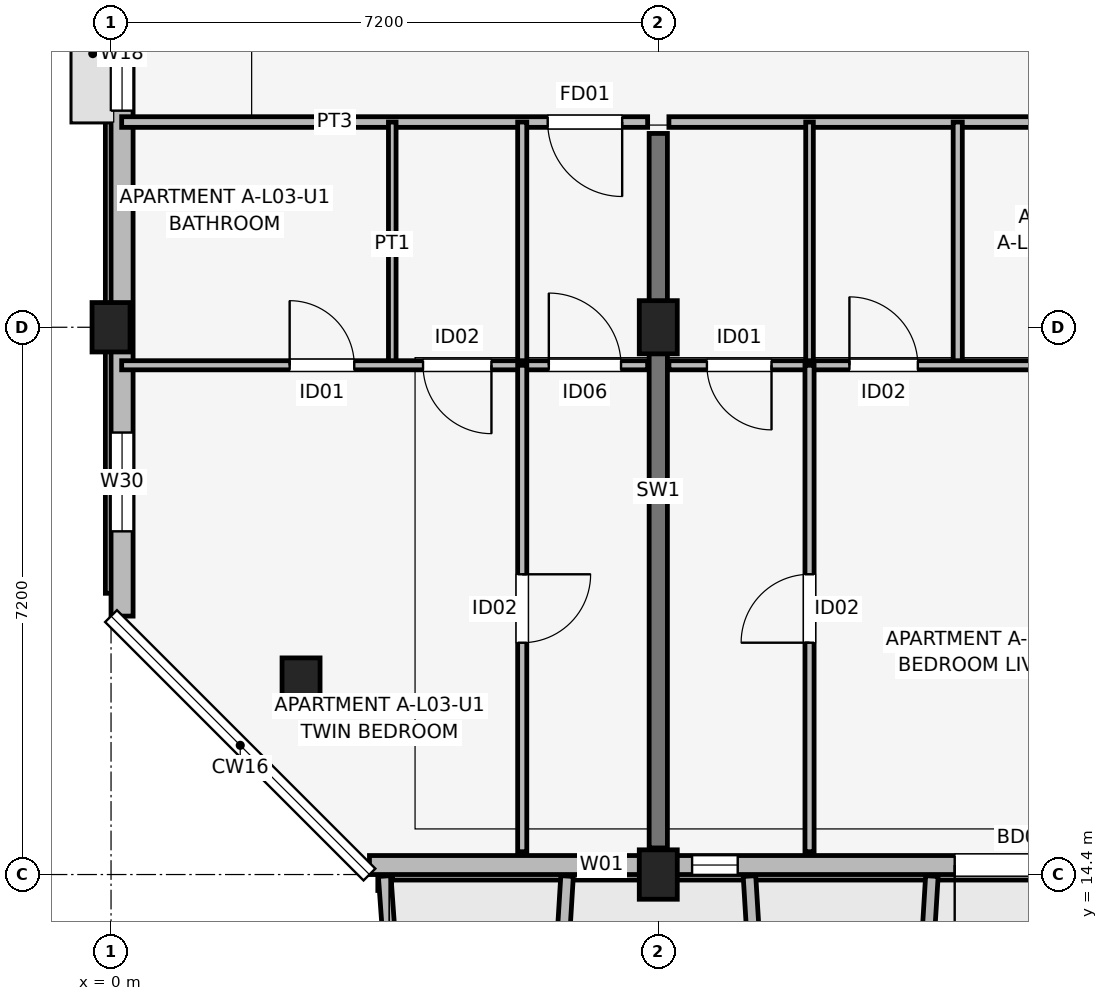
"""IFC4 building model, lengths in metres.
Left out: names, types, materials, properties, quantities, classifications, styles, units other than length and angle.
Written with IfcOpenShell. Run it as: python <this file> out.ifc"""

import sys

from ifc_helpers import new_model, si_unit, direction, frame, frame_2d, origin, origin_2d, place, context, subcontext, project, spatial, rectangle, extrude, element, fill, save


model = new_model("IFC4")
c1 = context("Model", 3, precision=1e-05, world=origin(), true_north=direction((0.0, 1.0)))
c2 = subcontext(c1, "Body", "Model", "MODEL_VIEW")
j1 = project(units=[si_unit("LENGTHUNIT", "METRE"), si_unit("PLANEANGLEUNIT", "RADIAN")], contexts=[c1])
p1 = place(None, origin())
s1 = spatial("IfcSite", under=j1, at=p1, CompositionType="ELEMENT")
p2 = place(p1, origin())
s2 = spatial("IfcBuilding", under=s1, at=p2, CompositionType="ELEMENT")
p3 = place(p2, frame((0.0, 0.0, 11.85)))
s3 = spatial("IfcBuildingStorey", under=s2, at=p3, CompositionType="ELEMENT", Elevation=11.85)
p4 = place(p3, frame((2.5, 16.9, 0.0), z_axis=(0.0, 0.0, 1.0), x_axis=(1.0, 0.0, 0.0)))
e1 = element("IfcColumn", 1, at=p4, inside=s3, PredefinedType="COLUMN", context=c2, shape_type="SweptSolid", body=[
    extrude(rectangle(XDim=0.5, YDim=0.7, at=origin_2d()), origin(), (0.0, 0.0, 1.0), 3.15),
])
for number, where, z_axis, x_axis in (
    (2, (0.0, 21.6, 0.0), (0.0, 0.0, 1.0), (1.0, 0.0, 0.0)),
    (3, (7.2, 14.4, 0.0), (0.0, 0.0, 1.0), (1.0, 0.0, 0.0)),
):
    element("IfcColumn", number, at=place(p3, frame(where, z_axis=z_axis, x_axis=x_axis)), inside=s3, PredefinedType="COLUMN", context=c2, shape_type="SweptSolid", body=[
        extrude(rectangle(XDim=0.5, YDim=0.65, at=origin_2d()), origin(), (0.0, 0.0, 1.0), 3.15),
    ])
p5 = place(p3, frame((7.2, 21.6, 0.0), z_axis=(0.0, 0.0, 1.0), x_axis=(1.0, 0.0, 0.0)))
e4 = element("IfcColumn", 4, at=p5, inside=s3, PredefinedType="COLUMN", context=c2, shape_type="SweptSolid", body=[
    extrude(rectangle(XDim=0.5, YDim=0.7, at=origin_2d()), origin(), (0.0, 0.0, 1.0), 3.15),
])
p6 = place(p3, frame((7.2, 14.75, 0.0), z_axis=(0.0, 0.0, 1.0), x_axis=(0.0, 1.0, 0.0)))
e5 = element("IfcWall", 5, at=p6, inside=s3, PredefinedType="SHEAR", context=c2, shape_type="SweptSolid", body=[
    extrude(rectangle(XDim=9.4, YDim=0.24, at=frame_2d((4.7, 0.0))), origin(), (0.0, 0.0, 1.0), 3.15),
])
p7 = place(p3, frame((3.4, 14.525, 0.0), z_axis=(0.0, 0.0, 1.0), x_axis=(1.0, 0.0, 0.0)))
e6 = element("IfcWall", 6, at=p7, inside=s3, PredefinedType="SOLIDWALL", context=c2, shape_type="SweptSolid", body=[
    extrude(rectangle(XDim=29.2, YDim=0.25, at=frame_2d((14.6, 0.0))), origin(), (0.0, 0.0, 1.0), 2.43),
])
p8 = place(p7, frame((9.5, 0.0, 0.0), z_axis=(0.0, 0.0, 1.0), x_axis=(-1.0, 0.0, 0.0)))
e7 = element("IfcOpeningElement", 7, at=p8, cuts=e6, PredefinedType="OPENING", context=c2, shape_type="SweptSolid", body=[
    extrude(rectangle(XDim=1.8, YDim=2.15, at=frame_2d((0.9, 1.075))), frame((0.0, 0.135, 0.0), z_axis=(0.0, -1.0, 0.0), x_axis=(1.0, 0.0, 0.0)), (0.0, 0.0, 1.0), 0.27),
])
p9 = place(p7, frame((23.825, 0.0, 0.0), z_axis=(0.0, 0.0, 1.0), x_axis=(-1.0, 0.0, 0.0)))
e8 = element("IfcOpeningElement", 8, at=p9, cuts=e6, PredefinedType="OPENING", context=c2, shape_type="SweptSolid", body=[
    extrude(rectangle(XDim=1.65, YDim=2.15, at=frame_2d((0.825, 1.075))), frame((0.0, 0.135, 0.0), z_axis=(0.0, -1.0, 0.0), x_axis=(1.0, 0.0, 0.0)), (0.0, 0.0, 1.0), 0.27),
])
p10 = place(p7, frame((2.755, 0.0, 0.75)))
e9 = element("IfcOpeningElement", 9, at=p10, cuts=e6, PredefinedType="OPENING", context=c2, shape_type="SweptSolid", body=[
    extrude(rectangle(XDim=0.6, YDim=1.25, at=frame_2d((0.3, 0.625))), frame((0.0, 0.135, 0.0), z_axis=(0.0, -1.0, 0.0), x_axis=(1.0, 0.0, 0.0)), (0.0, 0.0, 1.0), 0.27),
])
p11 = place(p7, frame((4.245, 0.0, 0.75)))
e10 = element("IfcOpeningElement", 10, at=p11, cuts=e6, PredefinedType="OPENING", context=c2, shape_type="SweptSolid", body=[
    extrude(rectangle(XDim=0.6, YDim=1.25, at=frame_2d((0.3, 0.625))), frame((0.0, 0.135, 0.0), z_axis=(0.0, -1.0, 0.0), x_axis=(1.0, 0.0, 0.0)), (0.0, 0.0, 1.0), 0.27),
])
p12 = place(p7, frame((12.54, 0.0, 0.7)))
e11 = element("IfcOpeningElement", 11, at=p12, cuts=e6, PredefinedType="OPENING", context=c2, shape_type="SweptSolid", body=[
    extrude(rectangle(XDim=1.72, YDim=1.6, at=frame_2d((0.86, 0.8))), frame((0.0, 0.135, 0.0), z_axis=(0.0, -1.0, 0.0), x_axis=(1.0, 0.0, 0.0)), (0.0, 0.0, 1.0), 0.27),
])
p13 = place(p7, frame((15.765, 0.0, 0.75)))
e12 = element("IfcOpeningElement", 12, at=p13, cuts=e6, PredefinedType="OPENING", context=c2, shape_type="SweptSolid", body=[
    extrude(rectangle(XDim=0.72, YDim=1.35, at=frame_2d((0.36, 0.675))), frame((0.0, 0.135, 0.0), z_axis=(0.0, -1.0, 0.0), x_axis=(1.0, 0.0, 0.0)), (0.0, 0.0, 1.0), 0.27),
])
p14 = place(p7, frame((19.555, 0.0, 0.75)))
e13 = element("IfcOpeningElement", 13, at=p14, cuts=e6, PredefinedType="OPENING", context=c2, shape_type="SweptSolid", body=[
    extrude(rectangle(XDim=0.72, YDim=1.35, at=frame_2d((0.36, 0.675))), frame((0.0, 0.135, 0.0), z_axis=(0.0, -1.0, 0.0), x_axis=(1.0, 0.0, 0.0)), (0.0, 0.0, 1.0), 0.27),
])
p15 = place(p7, frame((25.845, 0.0, 0.75)))
e14 = element("IfcOpeningElement", 14, at=p15, cuts=e6, PredefinedType="OPENING", context=c2, shape_type="SweptSolid", body=[
    extrude(rectangle(XDim=0.6, YDim=1.25, at=frame_2d((0.3, 0.625))), frame((0.0, 0.135, 0.0), z_axis=(0.0, -1.0, 0.0), x_axis=(1.0, 0.0, 0.0)), (0.0, 0.0, 1.0), 0.27),
])
p16 = place(p7, frame((27.68, 0.0, 0.75)))
e15 = element("IfcOpeningElement", 15, at=p16, cuts=e6, PredefinedType="OPENING", context=c2, shape_type="SweptSolid", body=[
    extrude(rectangle(XDim=1.1, YDim=1.5, at=frame_2d((0.55, 0.75))), frame((0.0, 0.135, 0.0), z_axis=(0.0, -1.0, 0.0), x_axis=(1.0, 0.0, 0.0)), (0.0, 0.0, 1.0), 0.27),
])
p17 = place(p3, frame((0.145, 32.6, 0.0), z_axis=(0.0, 0.0, 1.0), x_axis=(0.0, -1.0, 0.0)))
e16 = element("IfcWall", 16, at=p17, inside=s3, PredefinedType="SOLIDWALL", context=c2, shape_type="SweptSolid", body=[
    extrude(rectangle(XDim=14.8, YDim=0.29, at=frame_2d((7.4, 0.0))), origin(), (0.0, 0.0, 1.0), 2.38),
])
p18 = place(p17, frame((6.65, 0.0, 1.05)))
e17 = element("IfcOpeningElement", 17, at=p18, cuts=e16, PredefinedType="OPENING", context=c2, shape_type="SweptSolid", body=[
    extrude(rectangle(XDim=1.5, YDim=1.15, at=frame_2d((0.75, 0.575))), frame((0.0, 0.155, 0.0), z_axis=(0.0, -1.0, 0.0), x_axis=(1.0, 0.0, 0.0)), (0.0, 0.0, 1.0), 0.31),
])
p19 = place(p17, frame((12.385, 0.0, 0.72)))
e18 = element("IfcOpeningElement", 18, at=p19, cuts=e16, PredefinedType="OPENING", context=c2, shape_type="SweptSolid", body=[
    extrude(rectangle(XDim=1.3, YDim=1.55, at=frame_2d((0.65, 0.775))), frame((0.0, 0.155, 0.0), z_axis=(0.0, -1.0, 0.0), x_axis=(1.0, 0.0, 0.0)), (0.0, 0.0, 1.0), 0.31),
])
p20 = place(p3, frame((3.6, 14.38, 0.0), z_axis=(0.0, 0.0, 1.0), x_axis=(0.071194071069, -0.997462482625, 0.0)))
e19 = element("IfcWall", 19, at=p20, inside=s3, PredefinedType="ELEMENTEDWALL", context=c2, shape_type="SweptSolid", body=[
    extrude(rectangle(XDim=1.965, YDim=0.165, at=frame_2d((0.982, 0.0))), origin(), (0.0, 0.0, 1.0), 2.95),
])
p21 = place(p3, frame((6.0, 14.38, 0.0), z_axis=(0.0, 0.0, 1.0), x_axis=(-0.061170732449, -0.998127317276, 0.0)))
e20 = element("IfcWall", 20, at=p21, inside=s3, PredefinedType="ELEMENTEDWALL", context=c2, shape_type="SweptSolid", body=[
    extrude(rectangle(XDim=1.964, YDim=0.165, at=frame_2d((0.982, 0.0))), origin(), (0.0, 0.0, 1.0), 2.95),
])
for number, where, z_axis, x_axis in (
    (21, (8.4, 14.38, 0.0), (0.0, 0.0, 1.0), (0.061, -0.998, 0.0)),
    (22, (10.8, 14.38, 0.0), (0.0, 0.0, 1.0), (-0.061, -0.998, 0.0)),
):
    element("IfcWall", number, at=place(p3, frame(where, z_axis=z_axis, x_axis=x_axis)), inside=s3, PredefinedType="ELEMENTEDWALL", context=c2, shape_type="SweptSolid", body=[
        extrude(rectangle(XDim=1.964, YDim=0.165, at=frame_2d((0.982, 0.0))), origin(), (0.0, 0.0, 1.0), 2.58),
    ])
p22 = place(p3, frame((0.14, 24.3, 0.0), z_axis=(0.0, 0.0, 1.0), x_axis=(1.0, 0.0, 0.0)))
e23 = element("IfcWall", 23, at=p22, inside=s3, PredefinedType="PARTITIONING", context=c2, shape_type="SweptSolid", body=[
    extrude(rectangle(XDim=6.92, YDim=0.14, at=frame_2d((3.46, 0.0))), origin(), (0.0, 0.0, 1.0), 2.38),
])
p23 = place(p22, frame((6.585, 0.0, 0.0), z_axis=(0.0, 0.0, 1.0), x_axis=(-1.0, 0.0, 0.0)))
e24 = element("IfcOpeningElement", 24, at=p23, cuts=e23, PredefinedType="OPENING", context=c2, shape_type="SweptSolid", body=[
    extrude(rectangle(XDim=0.98, YDim=2.1, at=frame_2d((0.49, 1.05))), frame((0.0, 0.08, 0.0), z_axis=(0.0, -1.0, 0.0), x_axis=(1.0, 0.0, 0.0)), (0.0, 0.0, 1.0), 0.16),
])
p24 = place(p3, frame((3.7, 21.1, 0.0), z_axis=(0.0, 0.0, 1.0), x_axis=(0.0, 1.0, 0.0)))
e25 = element("IfcWall", 25, at=p24, inside=s3, PredefinedType="PARTITIONING", context=c2, shape_type="SweptSolid", body=[
    extrude(rectangle(XDim=3.2, YDim=0.1, at=frame_2d((1.6, 0.0))), origin(), (0.0, 0.0, 1.0), 2.375),
])
p25 = place(p3, frame((5.41, 21.1, 0.0), z_axis=(0.0, 0.0, 1.0), x_axis=(0.0, 1.0, 0.0)))
e26 = element("IfcWall", 26, at=p25, inside=s3, PredefinedType="PARTITIONING", context=c2, shape_type="SweptSolid", body=[
    extrude(rectangle(XDim=3.2, YDim=0.12, at=frame_2d((1.6, 0.0))), origin(), (0.0, 0.0, 1.0), 2.375),
])
p26 = place(p3, frame((0.14, 21.1, 0.0), z_axis=(0.0, 0.0, 1.0), x_axis=(1.0, 0.0, 0.0)))
e27 = element("IfcWall", 27, at=p26, inside=s3, PredefinedType="PARTITIONING", context=c2, shape_type="SweptSolid", body=[
    extrude(rectangle(XDim=6.92, YDim=0.12, at=frame_2d((3.46, 0.0))), origin(), (0.0, 0.0, 1.0), 2.38),
])
p27 = place(p26, frame((2.21, 0.0, 0.0)))
e28 = element("IfcOpeningElement", 28, at=p27, cuts=e27, PredefinedType="OPENING", context=c2, shape_type="SweptSolid", body=[
    extrude(rectangle(XDim=0.85, YDim=2.08, at=frame_2d((0.425, 1.04))), frame((0.0, 0.07, 0.0), z_axis=(0.0, -1.0, 0.0), x_axis=(1.0, 0.0, 0.0)), (0.0, 0.0, 1.0), 0.14),
])
p28 = place(p26, frame((4.865, 0.0, 0.0), z_axis=(0.0, 0.0, 1.0), x_axis=(-1.0, 0.0, 0.0)))
e29 = element("IfcOpeningElement", 29, at=p28, cuts=e27, PredefinedType="OPENING", context=c2, shape_type="SweptSolid", body=[
    extrude(rectangle(XDim=0.9, YDim=2.08, at=frame_2d((0.45, 1.04))), frame((0.0, 0.07, 0.0), z_axis=(0.0, -1.0, 0.0), x_axis=(1.0, 0.0, 0.0)), (0.0, 0.0, 1.0), 0.14),
])
p29 = place(p26, frame((5.62, 0.0, 0.0)))
e30 = element("IfcOpeningElement", 30, at=p29, cuts=e27, PredefinedType="OPENING", context=c2, shape_type="SweptSolid", body=[
    extrude(rectangle(XDim=0.95, YDim=2.08, at=frame_2d((0.475, 1.04))), frame((0.0, 0.07, 0.0), z_axis=(0.0, -1.0, 0.0), x_axis=(1.0, 0.0, 0.0)), (0.0, 0.0, 1.0), 0.14),
])
p30 = place(p3, frame((5.41, 14.7, 0.0), z_axis=(0.0, 0.0, 1.0), x_axis=(0.0, 1.0, 0.0)))
e31 = element("IfcWall", 31, at=p30, inside=s3, PredefinedType="PARTITIONING", context=c2, shape_type="SweptSolid", body=[
    extrude(rectangle(XDim=6.4, YDim=0.12, at=frame_2d((3.2, 0.0))), origin(), (0.0, 0.0, 1.0), 2.38),
])
p31 = place(p30, frame((3.65, 0.0, 0.0), z_axis=(0.0, 0.0, 1.0), x_axis=(-1.0, 0.0, 0.0)))
e32 = element("IfcOpeningElement", 32, at=p31, cuts=e31, PredefinedType="OPENING", context=c2, shape_type="SweptSolid", body=[
    extrude(rectangle(XDim=0.9, YDim=2.08, at=frame_2d((0.45, 1.04))), frame((0.0, 0.07, 0.0), z_axis=(0.0, -1.0, 0.0), x_axis=(1.0, 0.0, 0.0)), (0.0, 0.0, 1.0), 0.14),
])
p32 = place(p3, frame((7.34, 24.3, 0.0), z_axis=(0.0, 0.0, 1.0), x_axis=(1.0, 0.0, 0.0)))
e33 = element("IfcWall", 33, at=p32, inside=s3, PredefinedType="PARTITIONING", context=c2, shape_type="SweptSolid", body=[
    extrude(rectangle(XDim=6.92, YDim=0.14, at=frame_2d((3.46, 0.0))), origin(), (0.0, 0.0, 1.0), 2.38),
])
p33 = place(p32, frame((4.87, 0.0, 0.0)))
e34 = element("IfcOpeningElement", 34, at=p33, cuts=e33, PredefinedType="OPENING", context=c2, shape_type="SweptSolid", body=[
    extrude(rectangle(XDim=0.98, YDim=2.1, at=frame_2d((0.49, 1.05))), frame((0.0, 0.08, 0.0), z_axis=(0.0, -1.0, 0.0), x_axis=(1.0, 0.0, 0.0)), (0.0, 0.0, 1.0), 0.16),
])
p34 = place(p3, frame((9.19, 21.1, 0.0), z_axis=(0.0, 0.0, 1.0), x_axis=(0.0, 1.0, 0.0)))
e35 = element("IfcWall", 35, at=p34, inside=s3, PredefinedType="PARTITIONING", context=c2, shape_type="SweptSolid", body=[
    extrude(rectangle(XDim=3.2, YDim=0.1, at=frame_2d((1.6, 0.0))), origin(), (0.0, 0.0, 1.0), 2.375),
])
p35 = place(p3, frame((11.14, 21.1, 0.0), z_axis=(0.0, 0.0, 1.0), x_axis=(0.0, 1.0, 0.0)))
e36 = element("IfcWall", 36, at=p35, inside=s3, PredefinedType="PARTITIONING", context=c2, shape_type="SweptSolid", body=[
    extrude(rectangle(XDim=3.2, YDim=0.12, at=frame_2d((1.6, 0.0))), origin(), (0.0, 0.0, 1.0), 2.375),
])
p36 = place(p3, frame((7.34, 21.1, 0.0), z_axis=(0.0, 0.0, 1.0), x_axis=(1.0, 0.0, 0.0)))
e37 = element("IfcWall", 37, at=p36, inside=s3, PredefinedType="PARTITIONING", context=c2, shape_type="SweptSolid", body=[
    extrude(rectangle(XDim=6.92, YDim=0.12, at=frame_2d((3.46, 0.0))), origin(), (0.0, 0.0, 1.0), 2.38),
])
p37 = place(p36, frame((1.35, 0.0, 0.0), z_axis=(0.0, 0.0, 1.0), x_axis=(-1.0, 0.0, 0.0)))
e38 = element("IfcOpeningElement", 38, at=p37, cuts=e37, PredefinedType="OPENING", context=c2, shape_type="SweptSolid", body=[
    extrude(rectangle(XDim=0.85, YDim=2.08, at=frame_2d((0.425, 1.04))), frame((0.0, 0.07, 0.0), z_axis=(0.0, -1.0, 0.0), x_axis=(1.0, 0.0, 0.0)), (0.0, 0.0, 1.0), 0.14),
])
p38 = place(p36, frame((2.375, 0.0, 0.0)))
e39 = element("IfcOpeningElement", 39, at=p38, cuts=e37, PredefinedType="OPENING", context=c2, shape_type="SweptSolid", body=[
    extrude(rectangle(XDim=0.9, YDim=2.08, at=frame_2d((0.45, 1.04))), frame((0.0, 0.07, 0.0), z_axis=(0.0, -1.0, 0.0), x_axis=(1.0, 0.0, 0.0)), (0.0, 0.0, 1.0), 0.14),
])
p39 = place(p36, frame((5.835, 0.0, 0.0), z_axis=(0.0, 0.0, 1.0), x_axis=(-1.0, 0.0, 0.0)))
e40 = element("IfcOpeningElement", 40, at=p39, cuts=e37, PredefinedType="OPENING", context=c2, shape_type="SweptSolid", body=[
    extrude(rectangle(XDim=0.95, YDim=2.08, at=frame_2d((0.475, 1.04))), frame((0.0, 0.07, 0.0), z_axis=(0.0, -1.0, 0.0), x_axis=(1.0, 0.0, 0.0)), (0.0, 0.0, 1.0), 0.14),
])
p40 = place(p3, frame((9.19, 14.7, 0.0), z_axis=(0.0, 0.0, 1.0), x_axis=(0.0, 1.0, 0.0)))
e41 = element("IfcWall", 41, at=p40, inside=s3, PredefinedType="PARTITIONING", context=c2, shape_type="SweptSolid", body=[
    extrude(rectangle(XDim=6.4, YDim=0.12, at=frame_2d((3.2, 0.0))), origin(), (0.0, 0.0, 1.0), 2.38),
])
p41 = place(p40, frame((2.75, 0.0, 0.0)))
e42 = element("IfcOpeningElement", 42, at=p41, cuts=e41, PredefinedType="OPENING", context=c2, shape_type="SweptSolid", body=[
    extrude(rectangle(XDim=0.9, YDim=2.08, at=frame_2d((0.45, 1.04))), frame((0.0, 0.07, 0.0), z_axis=(0.0, -1.0, 0.0), x_axis=(1.0, 0.0, 0.0)), (0.0, 0.0, 1.0), 0.14),
])
p42 = place(p8, origin())
e43 = element("IfcDoor", 43, at=p42, inside=s3, OperationType="SINGLE_SWING_LEFT", PredefinedType="DOOR", context=c2, shape_type="SweptSolid", body=[
    extrude(rectangle(XDim=1.8, YDim=2.15, at=frame_2d((0.9, 1.075))), frame((0.0, 0.025, 0.0), z_axis=(0.0, -1.0, 0.0), x_axis=(1.0, 0.0, 0.0)), (0.0, 0.0, 1.0), 0.05),
])
fill(e7, e43)
p43 = place(p10, origin())
e44 = element("IfcWindow", 44, at=p43, inside=s3, PartitioningType="SINGLE_PANEL", PredefinedType="WINDOW", context=c2, shape_type="SweptSolid", body=[
    extrude(rectangle(XDim=0.6, YDim=1.25, at=frame_2d((0.3, 0.625))), frame((0.0, 0.03, 0.0), z_axis=(0.0, -1.0, 0.0), x_axis=(1.0, 0.0, 0.0)), (0.0, 0.0, 1.0), 0.06),
])
fill(e9, e44)
p44 = place(p11, origin())
e45 = element("IfcWindow", 45, at=p44, inside=s3, PartitioningType="SINGLE_PANEL", PredefinedType="WINDOW", context=c2, shape_type="SweptSolid", body=[
    extrude(rectangle(XDim=0.6, YDim=1.25, at=frame_2d((0.3, 0.625))), frame((0.0, 0.03, 0.0), z_axis=(0.0, -1.0, 0.0), x_axis=(1.0, 0.0, 0.0)), (0.0, 0.0, 1.0), 0.06),
])
fill(e10, e45)
p45 = place(p18, origin())
e46 = element("IfcWindow", 46, at=p45, inside=s3, PartitioningType="SINGLE_PANEL", PredefinedType="WINDOW", context=c2, shape_type="SweptSolid", body=[
    extrude(rectangle(XDim=1.5, YDim=1.15, at=frame_2d((0.75, 0.575))), frame((0.0, 0.03, 0.0), z_axis=(0.0, -1.0, 0.0), x_axis=(1.0, 0.0, 0.0)), (0.0, 0.0, 1.0), 0.06),
])
fill(e17, e46)
p46 = place(p19, origin())
e47 = element("IfcWindow", 47, at=p46, inside=s3, PartitioningType="SINGLE_PANEL", PredefinedType="WINDOW", context=c2, shape_type="SweptSolid", body=[
    extrude(rectangle(XDim=1.3, YDim=1.55, at=frame_2d((0.65, 0.775))), frame((0.0, 0.03, 0.0), z_axis=(0.0, -1.0, 0.0), x_axis=(1.0, 0.0, 0.0)), (0.0, 0.0, 1.0), 0.06),
])
fill(e18, e47)
p47 = place(p23, origin())
e48 = element("IfcDoor", 48, at=p47, inside=s3, OperationType="SINGLE_SWING_RIGHT", PredefinedType="DOOR", context=c2, shape_type="SweptSolid", body=[
    extrude(rectangle(XDim=0.98, YDim=2.1, at=frame_2d((0.49, 1.05))), frame((0.0, 0.025, 0.0), z_axis=(0.0, -1.0, 0.0), x_axis=(1.0, 0.0, 0.0)), (0.0, 0.0, 1.0), 0.05),
])
fill(e24, e48)
p48 = place(p27, origin())
e49 = element("IfcDoor", 49, at=p48, inside=s3, OperationType="SINGLE_SWING_LEFT", PredefinedType="DOOR", context=c2, shape_type="SweptSolid", body=[
    extrude(rectangle(XDim=0.85, YDim=2.08, at=frame_2d((0.425, 1.04))), frame((0.0, 0.025, 0.0), z_axis=(0.0, -1.0, 0.0), x_axis=(1.0, 0.0, 0.0)), (0.0, 0.0, 1.0), 0.05),
])
fill(e28, e49)
p49 = place(p28, origin())
e50 = element("IfcDoor", 50, at=p49, inside=s3, OperationType="SINGLE_SWING_RIGHT", PredefinedType="DOOR", context=c2, shape_type="SweptSolid", body=[
    extrude(rectangle(XDim=0.9, YDim=2.08, at=frame_2d((0.45, 1.04))), frame((0.0, 0.025, 0.0), z_axis=(0.0, -1.0, 0.0), x_axis=(1.0, 0.0, 0.0)), (0.0, 0.0, 1.0), 0.05),
])
fill(e29, e50)
p50 = place(p29, origin())
e51 = element("IfcDoor", 51, at=p50, inside=s3, OperationType="SINGLE_SWING_LEFT", PredefinedType="DOOR", context=c2, shape_type="SweptSolid", body=[
    extrude(rectangle(XDim=0.95, YDim=2.08, at=frame_2d((0.475, 1.04))), frame((0.0, 0.025, 0.0), z_axis=(0.0, -1.0, 0.0), x_axis=(1.0, 0.0, 0.0)), (0.0, 0.0, 1.0), 0.05),
])
fill(e30, e51)
p51 = place(p31, origin())
e52 = element("IfcDoor", 52, at=p51, inside=s3, OperationType="SINGLE_SWING_RIGHT", PredefinedType="DOOR", context=c2, shape_type="SweptSolid", body=[
    extrude(rectangle(XDim=0.9, YDim=2.08, at=frame_2d((0.45, 1.04))), frame((0.0, 0.025, 0.0), z_axis=(0.0, -1.0, 0.0), x_axis=(1.0, 0.0, 0.0)), (0.0, 0.0, 1.0), 0.05),
])
fill(e32, e52)
p52 = place(p37, origin())
e53 = element("IfcDoor", 53, at=p52, inside=s3, OperationType="SINGLE_SWING_RIGHT", PredefinedType="DOOR", context=c2, shape_type="SweptSolid", body=[
    extrude(rectangle(XDim=0.85, YDim=2.08, at=frame_2d((0.425, 1.04))), frame((0.0, 0.025, 0.0), z_axis=(0.0, -1.0, 0.0), x_axis=(1.0, 0.0, 0.0)), (0.0, 0.0, 1.0), 0.05),
])
fill(e38, e53)
p53 = place(p38, origin())
e54 = element("IfcDoor", 54, at=p53, inside=s3, OperationType="SINGLE_SWING_LEFT", PredefinedType="DOOR", context=c2, shape_type="SweptSolid", body=[
    extrude(rectangle(XDim=0.9, YDim=2.08, at=frame_2d((0.45, 1.04))), frame((0.0, 0.025, 0.0), z_axis=(0.0, -1.0, 0.0), x_axis=(1.0, 0.0, 0.0)), (0.0, 0.0, 1.0), 0.05),
])
fill(e39, e54)
p54 = place(p41, origin())
e55 = element("IfcDoor", 55, at=p54, inside=s3, OperationType="SINGLE_SWING_LEFT", PredefinedType="DOOR", context=c2, shape_type="SweptSolid", body=[
    extrude(rectangle(XDim=0.9, YDim=2.08, at=frame_2d((0.45, 1.04))), frame((0.0, 0.025, 0.0), z_axis=(0.0, -1.0, 0.0), x_axis=(1.0, 0.0, 0.0)), (0.0, 0.0, 1.0), 0.05),
])
fill(e42, e55)
save(model, sys.argv[1])
